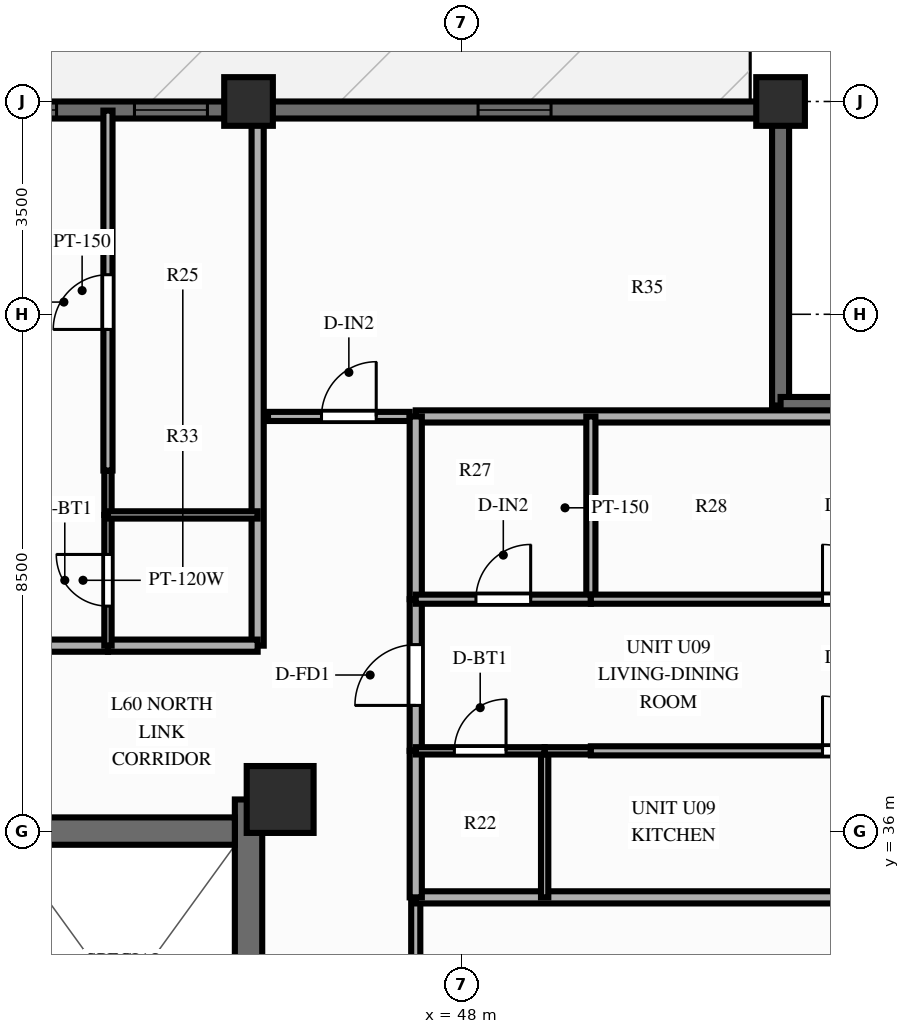
"""IFC4 building model, lengths in metres.
Left out: names, types, materials, properties, quantities, classifications, styles, units other than length and angle.
Written with IfcOpenShell. Run it as: python <this file> out.ifc"""

import sys

from ifc_helpers import new_model, si_unit, direction, frame, frame_2d, origin, origin_2d, place, context, subcontext, project, spatial, rectangle, extrude, source, transform, mapped, element, fill, save


model = new_model("IFC4")
c1 = context("Model", 3, precision=1e-05, world=origin(), true_north=direction((0.0, 1.0)))
c2 = subcontext(c1, "Body", "Model", "MODEL_VIEW")
j1 = project(units=[si_unit("LENGTHUNIT", "METRE"), si_unit("PLANEANGLEUNIT", "RADIAN")], contexts=[c1])
p1 = place(None, origin())
s1 = spatial("IfcSite", under=j1, at=p1, CompositionType="ELEMENT")
p2 = place(p1, origin())
s2 = spatial("IfcBuilding", under=s1, at=p2, CompositionType="ELEMENT")
p3 = place(p2, frame((0.0, 0.0, 192.7)))
s3 = spatial("IfcBuildingStorey", under=s2, at=p3, CompositionType="ELEMENT", Elevation=192.7)
p4 = place(p3, frame((44.5, 17.48, 0.0), z_axis=(0.0, 0.0, 1.0), x_axis=(0.0, 1.0, 0.0)))
e1 = element("IfcWall", 1, at=p4, inside=s3, PredefinedType="SHEAR", context=c2, shape_type="SweptSolid", body=[
    extrude(rectangle(XDim=19.04, YDim=0.45, at=frame_2d((9.52, 0.0))), origin(), (0.0, 0.0, 1.0), 3.9),
])
p5 = place(p4, frame((12.67, 0.0, 0.0), z_axis=(0.0, 0.0, 1.0), x_axis=(-1.0, 0.0, 0.0)))
e2 = element("IfcOpeningElement", 2, at=p5, cuts=e1, PredefinedType="OPENING", context=c2, shape_type="SweptSolid", body=[
    extrude(rectangle(XDim=1.1, YDim=2.15, at=frame_2d((0.55, 1.075))), frame((0.0, 0.237, 0.0), z_axis=(0.0, -1.0, 0.0), x_axis=(1.0, 0.0, 0.0)), (0.0, 0.0, 1.0), 0.474),
])
p6 = place(p3, frame((31.725, 36.0, 0.0), z_axis=(0.0, 0.0, 1.0), x_axis=(1.0, 0.0, 0.0)))
e3 = element("IfcWall", 3, at=p6, inside=s3, PredefinedType="SHEAR", context=c2, shape_type="SweptSolid", body=[
    extrude(rectangle(XDim=12.55, YDim=0.45, at=frame_2d((6.275, 0.0))), origin(), (0.0, 0.0, 1.0), 3.9),
])
p7 = place(p6, frame((5.225, 0.0, 0.0), z_axis=(0.0, 0.0, 1.0), x_axis=(-1.0, 0.0, 0.0)))
e4 = element("IfcOpeningElement", 4, at=p7, cuts=e3, PredefinedType="OPENING", context=c2, shape_type="SweptSolid", body=[
    extrude(rectangle(XDim=1.4, YDim=2.15, at=frame_2d((0.7, 1.075))), frame((0.0, 0.237, 0.0), z_axis=(0.0, -1.0, 0.0), x_axis=(1.0, 0.0, 0.0)), (0.0, 0.0, 1.0), 0.474),
])
m1 = source(origin(), c2, "Body", "SweptSolid", [
    extrude(rectangle(XDim=1.1, YDim=1.1, at=origin_2d()), origin(), (0.0, 0.0, 1.0), 3.9),
])
p8 = place(p3, frame((45.02, 36.52, 0.0), z_axis=(0.0, 0.0, 1.0), x_axis=(1.0, 0.0, 0.0)))
e5 = element("IfcColumn", 5, at=p8, inside=s3, PredefinedType="COLUMN", context=c2, shape_type="MappedRepresentation", body=[
    mapped(m1, transform((0.0, 0.0, 0.0), scale=1.0)),
])
m2 = source(origin(), c2, "Body", "SweptSolid", [
    extrude(rectangle(XDim=0.8, YDim=0.8, at=origin_2d()), origin(), (0.0, 0.0, 1.0), 3.9),
])
for number, where, z_axis, x_axis in (
    (6, (53.25, 48.0, 0.0), (0.0, 0.0, 1.0), (1.0, 0.0, 0.0)),
    (7, (44.5, 48.0, 0.0), (0.0, 0.0, 1.0), (1.0, 0.0, 0.0)),
):
    element("IfcColumn", number, at=place(p3, frame(where, z_axis=z_axis, x_axis=x_axis)), inside=s3, PredefinedType="COLUMN", context=c2, shape_type="MappedRepresentation", body=[
        mapped(m2, transform((0.0, 0.0, 0.0), scale=1.0)),
    ])
p9 = place(p3, frame((22.75, 47.86, 0.0), z_axis=(0.0, 0.0, 1.0), x_axis=(1.0, 0.0, 0.0)))
e8 = element("IfcWall", 8, at=p9, inside=s3, PredefinedType="SOLIDWALL", context=c2, shape_type="SweptSolid", body=[
    extrude(rectangle(XDim=30.5, YDim=0.28, at=frame_2d((15.25, 0.0))), origin(), (0.0, 0.0, 1.0), 2.44),
])
p10 = place(p9, frame((3.825, 0.0, 0.0)))
e9 = element("IfcOpeningElement", 9, at=p10, cuts=e8, PredefinedType="OPENING", context=c2, shape_type="SweptSolid", body=[
    extrude(rectangle(XDim=1.1, YDim=2.15, at=frame_2d((0.55, 1.075))), frame((0.0, 0.152, 0.0), z_axis=(0.0, -1.0, 0.0), x_axis=(1.0, 0.0, 0.0)), (0.0, 0.0, 1.0), 0.304),
])
p11 = place(p9, frame((9.395, 0.0, 0.25)))
e10 = element("IfcOpeningElement", 10, at=p11, cuts=e8, PredefinedType="OPENING", context=c2, shape_type="SweptSolid", body=[
    extrude(rectangle(XDim=0.95, YDim=1.5, at=frame_2d((0.475, 0.75))), frame((0.0, 0.152, 0.0), z_axis=(0.0, -1.0, 0.0), x_axis=(1.0, 0.0, 0.0)), (0.0, 0.0, 1.0), 0.304),
])
p12 = place(p9, frame((11.483, 0.0, 0.25)))
e11 = element("IfcOpeningElement", 11, at=p12, cuts=e8, PredefinedType="OPENING", context=c2, shape_type="SweptSolid", body=[
    extrude(rectangle(XDim=1.2, YDim=1.5, at=frame_2d((0.6, 0.75))), frame((0.0, 0.152, 0.0), z_axis=(0.0, -1.0, 0.0), x_axis=(1.0, 0.0, 0.0)), (0.0, 0.0, 1.0), 0.304),
])
p13 = place(p9, frame((14.383, 0.0, 0.25)))
e12 = element("IfcOpeningElement", 12, at=p13, cuts=e8, PredefinedType="OPENING", context=c2, shape_type="SweptSolid", body=[
    extrude(rectangle(XDim=1.2, YDim=1.5, at=frame_2d((0.6, 0.75))), frame((0.0, 0.152, 0.0), z_axis=(0.0, -1.0, 0.0), x_axis=(1.0, 0.0, 0.0)), (0.0, 0.0, 1.0), 0.304),
])
p14 = place(p9, frame((17.393, 0.0, 0.25)))
e13 = element("IfcOpeningElement", 13, at=p14, cuts=e8, PredefinedType="OPENING", context=c2, shape_type="SweptSolid", body=[
    extrude(rectangle(XDim=1.2, YDim=1.5, at=frame_2d((0.6, 0.75))), frame((0.0, 0.152, 0.0), z_axis=(0.0, -1.0, 0.0), x_axis=(1.0, 0.0, 0.0)), (0.0, 0.0, 1.0), 0.304),
])
p15 = place(p9, frame((19.874, 0.0, 0.25)))
e14 = element("IfcOpeningElement", 14, at=p15, cuts=e8, PredefinedType="OPENING", context=c2, shape_type="SweptSolid", body=[
    extrude(rectangle(XDim=1.2, YDim=1.5, at=frame_2d((0.6, 0.75))), frame((0.0, 0.152, 0.0), z_axis=(0.0, -1.0, 0.0), x_axis=(1.0, 0.0, 0.0)), (0.0, 0.0, 1.0), 0.304),
])
p16 = place(p9, frame((25.525, 0.0, 0.25)))
e15 = element("IfcOpeningElement", 15, at=p16, cuts=e8, PredefinedType="OPENING", context=c2, shape_type="SweptSolid", body=[
    extrude(rectangle(XDim=1.2, YDim=1.5, at=frame_2d((0.6, 0.75))), frame((0.0, 0.152, 0.0), z_axis=(0.0, -1.0, 0.0), x_axis=(1.0, 0.0, 0.0)), (0.0, 0.0, 1.0), 0.304),
])
for number, where, z_axis, x_axis in (
    (16, (53.25, 43.0, 0.0), (0.0, 0.0, 1.0), (0.0, 1.0, 0.0)),
    (17, (53.25, 43.0, 0.0), (0.0, 0.0, 1.0), (1.0, 0.0, 0.0)),
):
    element("IfcWall", number, at=place(p3, frame(where, z_axis=z_axis, x_axis=x_axis)), inside=s3, PredefinedType="SOLIDWALL", context=c2, shape_type="SweptSolid", body=[
        extrude(rectangle(XDim=4.92, YDim=0.28, at=frame_2d((2.46, 0.0))), origin(), (0.0, 0.0, 1.0), 2.44),
    ])
p17 = place(p3, frame((44.82, 42.82, 0.0), z_axis=(0.0, 0.0, 1.0), x_axis=(1.0, 0.0, 0.0)))
e18 = element("IfcWall", 18, at=p17, inside=s3, PredefinedType="PARTITIONING", context=c2, shape_type="SweptSolid", body=[
    extrude(rectangle(XDim=2.33, YDim=0.15, at=frame_2d((1.165, 0.0))), origin(), (0.0, 0.0, 1.0), 2.24),
])
p18 = place(p17, frame((0.88, 0.0, 0.0)))
e19 = element("IfcOpeningElement", 19, at=p18, cuts=e18, PredefinedType="OPENING", context=c2, shape_type="SweptSolid", body=[
    extrude(rectangle(XDim=0.9, YDim=2.1, at=frame_2d((0.45, 1.05))), frame((0.0, 0.087, 0.0), z_axis=(0.0, -1.0, 0.0), x_axis=(1.0, 0.0, 0.0)), (0.0, 0.0, 1.0), 0.174),
])
p19 = place(p3, frame((44.65, 39.05, 0.0), z_axis=(0.0, 0.0, 1.0), x_axis=(0.0, 1.0, 0.0)))
e20 = element("IfcWall", 20, at=p19, inside=s3, PredefinedType="PARTITIONING", context=c2, shape_type="SweptSolid", body=[
    extrude(rectangle(XDim=8.8, YDim=0.2, at=frame_2d((4.4, 0.0))), origin(), (0.0, 0.0, 1.0), 2.44),
])
p20 = place(p3, frame((39.298, 39.05, 0.0), z_axis=(0.0, 0.0, 1.0), x_axis=(1.0, 0.0, 0.0)))
e21 = element("IfcWall", 21, at=p20, inside=s3, PredefinedType="PARTITIONING", context=c2, shape_type="SweptSolid", body=[
    extrude(rectangle(XDim=2.89, YDim=0.2, at=frame_2d((1.445, 0.0))), origin(), (0.0, 0.0, 1.0), 3.56),
])
p21 = place(p20, frame((0.945, 0.0, 0.0)))
e22 = element("IfcOpeningElement", 22, at=p21, cuts=e21, PredefinedType="OPENING", context=c2, shape_type="SweptSolid", body=[
    extrude(rectangle(XDim=1.0, YDim=2.15, at=frame_2d((0.5, 1.075))), frame((0.0, 0.112, 0.0), z_axis=(0.0, -1.0, 0.0), x_axis=(1.0, 0.0, 0.0)), (0.0, 0.0, 1.0), 0.224),
])
p22 = place(p3, frame((42.188, 39.05, 0.0), z_axis=(0.0, 0.0, 1.0), x_axis=(1.0, 0.0, 0.0)))
e23 = element("IfcWall", 23, at=p22, inside=s3, PredefinedType="PARTITIONING", context=c2, shape_type="SweptSolid", body=[
    extrude(rectangle(XDim=2.462, YDim=0.2, at=frame_2d((1.231, 0.0))), origin(), (0.0, 0.0, 1.0), 3.56),
])
p23 = place(p3, frame((42.188, 39.05, 0.0), z_axis=(0.0, 0.0, 1.0), x_axis=(0.0, 1.0, 0.0)))
e24 = element("IfcWall", 24, at=p23, inside=s3, PredefinedType="PARTITIONING", context=c2, shape_type="SweptSolid", body=[
    extrude(rectangle(XDim=2.15, YDim=0.12, at=frame_2d((1.075, 0.0))), origin(), (0.0, 0.0, 1.0), 3.56),
])
p24 = place(p23, frame((0.65, 0.0, 0.0)))
e25 = element("IfcOpeningElement", 25, at=p24, cuts=e24, PredefinedType="OPENING", context=c2, shape_type="SweptSolid", body=[
    extrude(rectangle(XDim=0.85, YDim=2.05, at=frame_2d((0.425, 1.025))), frame((0.0, 0.072, 0.0), z_axis=(0.0, -1.0, 0.0), x_axis=(1.0, 0.0, 0.0)), (0.0, 0.0, 1.0), 0.144),
])
p25 = place(p3, frame((42.188, 41.2, 0.0), z_axis=(0.0, 0.0, 1.0), x_axis=(0.0, 1.0, 0.0)))
e26 = element("IfcWall", 26, at=p25, inside=s3, PredefinedType="PARTITIONING", context=c2, shape_type="SweptSolid", body=[
    extrude(rectangle(XDim=0.73, YDim=0.12, at=frame_2d((0.365, 0.0))), origin(), (0.0, 0.0, 1.0), 3.56),
])
p26 = place(p3, frame((42.188, 41.2, 0.0), z_axis=(0.0, 0.0, 1.0), x_axis=(1.0, 0.0, 0.0)))
e27 = element("IfcWall", 27, at=p26, inside=s3, PredefinedType="PARTITIONING", context=c2, shape_type="SweptSolid", body=[
    extrude(rectangle(XDim=2.462, YDim=0.12, at=frame_2d((1.231, 0.0))), origin(), (0.0, 0.0, 1.0), 3.56),
])
p27 = place(p3, frame((42.188, 41.93, 0.0), z_axis=(0.0, 0.0, 1.0), x_axis=(0.0, 1.0, 0.0)))
e28 = element("IfcWall", 28, at=p27, inside=s3, PredefinedType="PARTITIONING", context=c2, shape_type="SweptSolid", body=[
    extrude(rectangle(XDim=5.92, YDim=0.15, at=frame_2d((2.96, 0.0))), origin(), (0.0, 0.0, 1.0), 3.56),
])
p28 = place(p27, frame((2.321, 0.0, 0.0)))
e29 = element("IfcOpeningElement", 29, at=p28, cuts=e28, PredefinedType="OPENING", context=c2, shape_type="SweptSolid", body=[
    extrude(rectangle(XDim=0.9, YDim=2.1, at=frame_2d((0.45, 1.05))), frame((0.0, 0.087, 0.0), z_axis=(0.0, -1.0, 0.0), x_axis=(1.0, 0.0, 0.0)), (0.0, 0.0, 1.0), 0.174),
])
p29 = place(p3, frame((47.25, 42.82, 0.0), z_axis=(0.0, 0.0, 1.0), x_axis=(1.0, 0.0, 0.0)))
e30 = element("IfcWall", 30, at=p29, inside=s3, PredefinedType="PARTITIONING", context=c2, shape_type="SweptSolid", body=[
    extrude(rectangle(XDim=10.85, YDim=0.2, at=frame_2d((5.425, 0.0))), origin(), (0.0, 0.0, 1.0), 2.24),
])
p30 = place(p3, frame((47.25, 27.0, 0.0), z_axis=(0.0, 0.0, 1.0), x_axis=(0.0, 1.0, 0.0)))
e31 = element("IfcWall", 31, at=p30, inside=s3, PredefinedType="PARTITIONING", context=c2, shape_type="SweptSolid", body=[
    extrude(rectangle(XDim=7.91, YDim=0.15, at=frame_2d((3.955, 0.0))), origin(), (0.0, 0.0, 1.0), 3.56),
])
p31 = place(p30, frame((3.405, 0.0, 0.0)))
e32 = element("IfcOpeningElement", 32, at=p31, cuts=e31, PredefinedType="OPENING", context=c2, shape_type="SweptSolid", body=[
    extrude(rectangle(XDim=1.1, YDim=2.15, at=frame_2d((0.55, 1.075))), frame((0.0, 0.087, 0.0), z_axis=(0.0, -1.0, 0.0), x_axis=(1.0, 0.0, 0.0)), (0.0, 0.0, 1.0), 0.174),
])
p32 = place(p3, frame((47.25, 34.91, 0.0), z_axis=(0.0, 0.0, 1.0), x_axis=(1.0, 0.0, 0.0)))
e33 = element("IfcWall", 33, at=p32, inside=s3, PredefinedType="PARTITIONING", context=c2, shape_type="SweptSolid", body=[
    extrude(rectangle(XDim=10.85, YDim=0.2, at=frame_2d((5.425, 0.0))), origin(), (0.0, 0.0, 1.0), 3.56),
])
p33 = place(p3, frame((47.25, 34.91, 0.0), z_axis=(0.0, 0.0, 1.0), x_axis=(0.0, 1.0, 0.0)))
e34 = element("IfcWall", 34, at=p33, inside=s3, PredefinedType="PARTITIONING", context=c2, shape_type="SweptSolid", body=[
    extrude(rectangle(XDim=2.41, YDim=0.2, at=frame_2d((1.205, 0.0))), origin(), (0.0, 0.0, 1.0), 3.56),
])
p34 = place(p3, frame((47.25, 37.32, 0.0), z_axis=(0.0, 0.0, 1.0), x_axis=(0.0, 1.0, 0.0)))
e35 = element("IfcWall", 35, at=p34, inside=s3, PredefinedType="PARTITIONING", context=c2, shape_type="SweptSolid", body=[
    extrude(rectangle(XDim=2.494, YDim=0.2, at=frame_2d((1.247, 0.0))), origin(), (0.0, 0.0, 1.0), 3.56),
])
p35 = place(p34, frame((0.747, 0.0, 0.0)))
e36 = element("IfcOpeningElement", 36, at=p35, cuts=e35, PredefinedType="OPENING", context=c2, shape_type="SweptSolid", body=[
    extrude(rectangle(XDim=1.0, YDim=2.15, at=frame_2d((0.5, 1.075))), frame((0.0, 0.112, 0.0), z_axis=(0.0, -1.0, 0.0), x_axis=(1.0, 0.0, 0.0)), (0.0, 0.0, 1.0), 0.224),
])
p36 = place(p3, frame((47.25, 39.814, 0.0), z_axis=(0.0, 0.0, 1.0), x_axis=(0.0, 1.0, 0.0)))
e37 = element("IfcWall", 37, at=p36, inside=s3, PredefinedType="PARTITIONING", context=c2, shape_type="SweptSolid", body=[
    extrude(rectangle(XDim=3.006, YDim=0.2, at=frame_2d((1.503, 0.0))), origin(), (0.0, 0.0, 1.0), 3.56),
])
p37 = place(p3, frame((49.37, 34.91, 0.0), z_axis=(0.0, 0.0, 1.0), x_axis=(0.0, 1.0, 0.0)))
e38 = element("IfcWall", 38, at=p37, inside=s3, PredefinedType="PARTITIONING", context=c2, shape_type="SweptSolid", body=[
    extrude(rectangle(XDim=2.41, YDim=0.12, at=frame_2d((1.205, 0.0))), origin(), (0.0, 0.0, 1.0), 3.56),
])
p38 = place(p3, frame((50.13, 39.814, 0.0), z_axis=(0.0, 0.0, 1.0), x_axis=(0.0, 1.0, 0.0)))
e39 = element("IfcWall", 39, at=p38, inside=s3, PredefinedType="PARTITIONING", context=c2, shape_type="SweptSolid", body=[
    extrude(rectangle(XDim=3.006, YDim=0.15, at=frame_2d((1.503, 0.0))), origin(), (0.0, 0.0, 1.0), 3.56),
])
p39 = place(p3, frame((47.25, 37.32, 0.0), z_axis=(0.0, 0.0, 1.0), x_axis=(1.0, 0.0, 0.0)))
e40 = element("IfcWall", 40, at=p39, inside=s3, PredefinedType="PARTITIONING", context=c2, shape_type="SweptSolid", body=[
    extrude(rectangle(XDim=2.12, YDim=0.12, at=frame_2d((1.06, 0.0))), origin(), (0.0, 0.0, 1.0), 3.56),
])
p40 = place(p39, frame((0.635, 0.0, 0.0)))
e41 = element("IfcOpeningElement", 41, at=p40, cuts=e40, PredefinedType="OPENING", context=c2, shape_type="SweptSolid", body=[
    extrude(rectangle(XDim=0.85, YDim=2.05, at=frame_2d((0.425, 1.025))), frame((0.0, 0.072, 0.0), z_axis=(0.0, -1.0, 0.0), x_axis=(1.0, 0.0, 0.0)), (0.0, 0.0, 1.0), 0.144),
])
p41 = place(p3, frame((49.37, 37.32, 0.0), z_axis=(0.0, 0.0, 1.0), x_axis=(1.0, 0.0, 0.0)))
e42 = element("IfcWall", 42, at=p41, inside=s3, PredefinedType="PARTITIONING", context=c2, shape_type="SweptSolid", body=[
    extrude(rectangle(XDim=0.76, YDim=0.12, at=frame_2d((0.38, 0.0))), origin(), (0.0, 0.0, 1.0), 3.56),
])
p42 = place(p3, frame((50.13, 37.32, 0.0), z_axis=(0.0, 0.0, 1.0), x_axis=(1.0, 0.0, 0.0)))
e43 = element("IfcWall", 43, at=p42, inside=s3, PredefinedType="PARTITIONING", context=c2, shape_type="SweptSolid", body=[
    extrude(rectangle(XDim=7.97, YDim=0.15, at=frame_2d((3.985, 0.0))), origin(), (0.0, 0.0, 1.0), 3.56),
])
p43 = place(p42, frame((3.81, 0.0, 0.0)))
e44 = element("IfcOpeningElement", 44, at=p43, cuts=e43, PredefinedType="OPENING", context=c2, shape_type="SweptSolid", body=[
    extrude(rectangle(XDim=0.9, YDim=2.1, at=frame_2d((0.45, 1.05))), frame((0.0, 0.087, 0.0), z_axis=(0.0, -1.0, 0.0), x_axis=(1.0, 0.0, 0.0)), (0.0, 0.0, 1.0), 0.174),
])
p44 = place(p3, frame((47.25, 39.814, 0.0), z_axis=(0.0, 0.0, 1.0), x_axis=(1.0, 0.0, 0.0)))
e45 = element("IfcWall", 45, at=p44, inside=s3, PredefinedType="PARTITIONING", context=c2, shape_type="SweptSolid", body=[
    extrude(rectangle(XDim=2.88, YDim=0.15, at=frame_2d((1.44, 0.0))), origin(), (0.0, 0.0, 1.0), 3.56),
])
p45 = place(p44, frame((0.99, 0.0, 0.0)))
e46 = element("IfcOpeningElement", 46, at=p45, cuts=e45, PredefinedType="OPENING", context=c2, shape_type="SweptSolid", body=[
    extrude(rectangle(XDim=0.9, YDim=2.1, at=frame_2d((0.45, 1.05))), frame((0.0, 0.087, 0.0), z_axis=(0.0, -1.0, 0.0), x_axis=(1.0, 0.0, 0.0)), (0.0, 0.0, 1.0), 0.174),
])
p46 = place(p3, frame((50.13, 39.814, 0.0), z_axis=(0.0, 0.0, 1.0), x_axis=(1.0, 0.0, 0.0)))
e47 = element("IfcWall", 47, at=p46, inside=s3, PredefinedType="PARTITIONING", context=c2, shape_type="SweptSolid", body=[
    extrude(rectangle(XDim=7.97, YDim=0.15, at=frame_2d((3.985, 0.0))), origin(), (0.0, 0.0, 1.0), 3.56),
])
p47 = place(p46, frame((3.81, 0.0, 0.0)))
e48 = element("IfcOpeningElement", 48, at=p47, cuts=e47, PredefinedType="OPENING", context=c2, shape_type="SweptSolid", body=[
    extrude(rectangle(XDim=0.9, YDim=2.1, at=frame_2d((0.45, 1.05))), frame((0.0, 0.087, 0.0), z_axis=(0.0, -1.0, 0.0), x_axis=(1.0, 0.0, 0.0)), (0.0, 0.0, 1.0), 0.174),
])
m3 = source(origin(), c2, "Body", "SweptSolid", [
    extrude(rectangle(XDim=1.2, YDim=1.5, at=frame_2d((0.6, 0.75))), frame((0.0, 0.03, 0.0), z_axis=(0.0, -1.0, 0.0), x_axis=(1.0, 0.0, 0.0)), (0.0, 0.0, 1.0), 0.06),
])
p48 = place(p14, origin())
e49 = element("IfcWindow", 49, at=p48, inside=s3, PartitioningType="SINGLE_PANEL", PredefinedType="WINDOW", context=c2, shape_type="MappedRepresentation", body=[
    mapped(m3, transform((0.0, 0.0, 0.0), scale=1.0)),
])
fill(e13, e49)
p49 = place(p15, origin())
e50 = element("IfcWindow", 50, at=p49, inside=s3, PartitioningType="SINGLE_PANEL", PredefinedType="WINDOW", context=c2, shape_type="MappedRepresentation", body=[
    mapped(m3, transform((0.0, 0.0, 0.0), scale=1.0)),
])
fill(e14, e50)
p50 = place(p16, origin())
e51 = element("IfcWindow", 51, at=p50, inside=s3, PartitioningType="SINGLE_PANEL", PredefinedType="WINDOW", context=c2, shape_type="MappedRepresentation", body=[
    mapped(m3, transform((0.0, 0.0, 0.0), scale=1.0)),
])
fill(e15, e51)
m4 = source(origin(), c2, "Body", "SweptSolid", [
    extrude(rectangle(XDim=0.9, YDim=2.1, at=frame_2d((0.45, 1.05))), frame((0.0, 0.025, 0.0), z_axis=(0.0, -1.0, 0.0), x_axis=(1.0, 0.0, 0.0)), (0.0, 0.0, 1.0), 0.05),
])
p51 = place(p18, origin())
e52 = element("IfcDoor", 52, at=p51, inside=s3, OperationType="SINGLE_SWING_RIGHT", PredefinedType="DOOR", context=c2, shape_type="MappedRepresentation", body=[
    mapped(m4, transform((0.0, 0.0, 0.0), scale=1.0)),
])
fill(e19, e52)
m5 = source(origin(), c2, "Body", "SweptSolid", [
    extrude(rectangle(XDim=0.85, YDim=2.05, at=frame_2d((0.425, 1.025))), frame((0.0, 0.025, 0.0), z_axis=(0.0, -1.0, 0.0), x_axis=(1.0, 0.0, 0.0)), (0.0, 0.0, 1.0), 0.05),
])
p52 = place(p24, origin())
e53 = element("IfcDoor", 53, at=p52, inside=s3, OperationType="SINGLE_SWING_RIGHT", PredefinedType="DOOR", context=c2, shape_type="MappedRepresentation", body=[
    mapped(m5, transform((0.0, 0.0, 0.0), scale=1.0)),
])
fill(e25, e53)
p53 = place(p28, origin())
e54 = element("IfcDoor", 54, at=p53, inside=s3, OperationType="SINGLE_SWING_LEFT", PredefinedType="DOOR", context=c2, shape_type="MappedRepresentation", body=[
    mapped(m4, transform((0.0, 0.0, 0.0), scale=1.0)),
])
fill(e29, e54)
m6 = source(origin(), c2, "Body", "SweptSolid", [
    extrude(rectangle(XDim=1.0, YDim=2.15, at=frame_2d((0.5, 1.075))), frame((0.0, 0.025, 0.0), z_axis=(0.0, -1.0, 0.0), x_axis=(1.0, 0.0, 0.0)), (0.0, 0.0, 1.0), 0.05),
])
p54 = place(p35, origin())
e55 = element("IfcDoor", 55, at=p54, inside=s3, OperationType="SINGLE_SWING_LEFT", PredefinedType="DOOR", context=c2, shape_type="MappedRepresentation", body=[
    mapped(m6, transform((0.0, 0.0, 0.0), scale=1.0)),
])
fill(e36, e55)
p55 = place(p40, origin())
e56 = element("IfcDoor", 56, at=p55, inside=s3, OperationType="SINGLE_SWING_RIGHT", PredefinedType="DOOR", context=c2, shape_type="MappedRepresentation", body=[
    mapped(m5, transform((0.0, 0.0, 0.0), scale=1.0)),
])
fill(e41, e56)
p56 = place(p43, origin())
e57 = element("IfcDoor", 57, at=p56, inside=s3, OperationType="SINGLE_SWING_LEFT", PredefinedType="DOOR", context=c2, shape_type="MappedRepresentation", body=[
    mapped(m4, transform((0.0, 0.0, 0.0), scale=1.0)),
])
fill(e44, e57)
p57 = place(p45, origin())
e58 = element("IfcDoor", 58, at=p57, inside=s3, OperationType="SINGLE_SWING_RIGHT", PredefinedType="DOOR", context=c2, shape_type="MappedRepresentation", body=[
    mapped(m4, transform((0.0, 0.0, 0.0), scale=1.0)),
])
fill(e46, e58)
p58 = place(p47, origin())
e59 = element("IfcDoor", 59, at=p58, inside=s3, OperationType="SINGLE_SWING_LEFT", PredefinedType="DOOR", context=c2, shape_type="MappedRepresentation", body=[
    mapped(m4, transform((0.0, 0.0, 0.0), scale=1.0)),
])
fill(e48, e59)
save(model, sys.argv[1])
